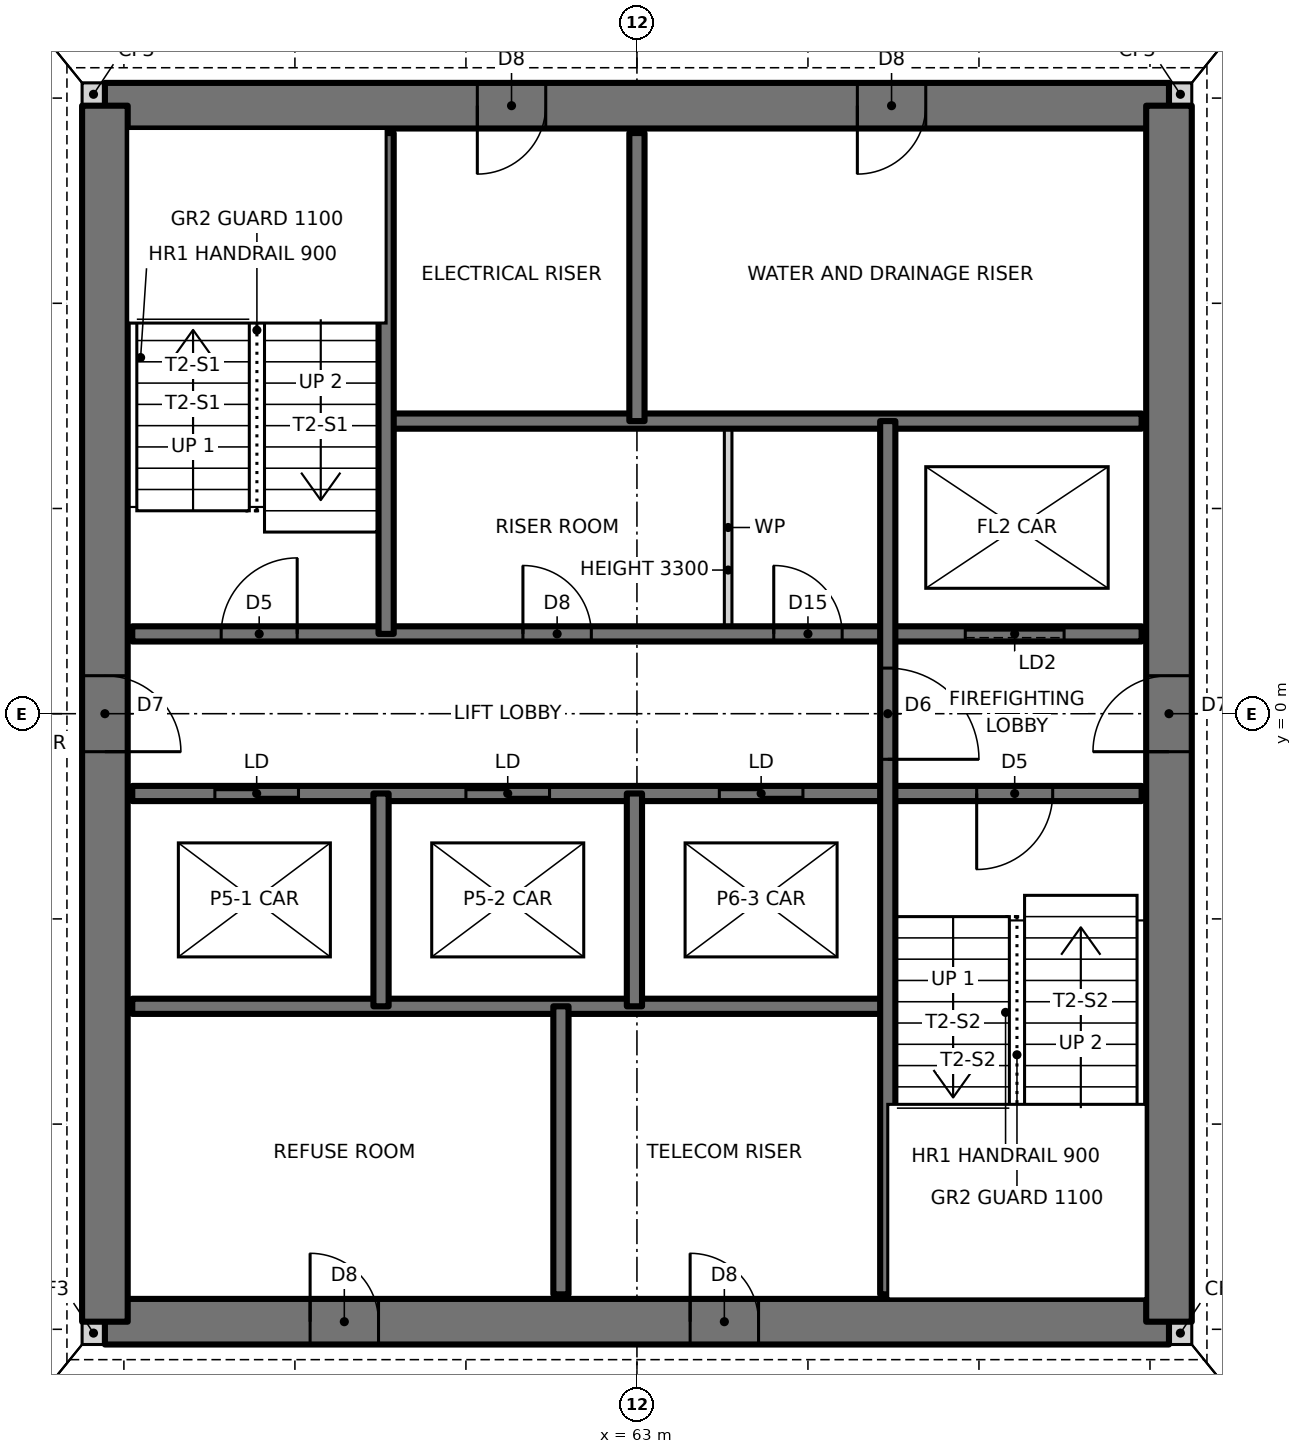
"""IFC4 building model, lengths in metres.
Left out: names, types, materials, properties, quantities, classifications, styles, units other than length and angle.
Written with IfcOpenShell. Run it as: python <this file> out.ifc"""

import sys

from ifc_helpers import new_model, si_unit, direction, frame, frame_2d, origin, place, context, subcontext, project, spatial, rectangle, extrude, element, fill, save


model = new_model("IFC4")
c1 = context("Model", 3, precision=1e-05, world=origin(), true_north=direction((0.0, 1.0)))
c2 = subcontext(c1, "Body", "Model", "MODEL_VIEW")
j1 = project(units=[si_unit("LENGTHUNIT", "METRE"), si_unit("PLANEANGLEUNIT", "RADIAN")], contexts=[c1])
p1 = place(None, origin())
s1 = spatial("IfcSite", under=j1, at=p1, CompositionType="ELEMENT")
p2 = place(p1, origin())
s2 = spatial("IfcBuilding", under=s1, at=p2, CompositionType="ELEMENT")
p3 = place(p2, frame((0.0, 0.0, 101.5)))
s3 = spatial("IfcBuildingStorey", under=s2, at=p3, CompositionType="ELEMENT", Elevation=101.5)
for number, where, z_axis, x_axis in (
    (1, (55.7, -8.15, 0.0), (0.0, 0.0, 1.0), (1.0, 0.0, 0.0)),
    (2, (70.0, -8.15, 0.0), (0.0, 0.0, 1.0), (1.0, 0.0, 0.0)),
    (3, (70.0, 8.15, 0.0), (0.0, 0.0, 1.0), (1.0, 0.0, 0.0)),
    (4, (55.7, 8.15, 0.0), (0.0, 0.0, 1.0), (1.0, 0.0, 0.0)),
):
    element("IfcWall", number, at=place(p3, frame(where, z_axis=z_axis, x_axis=x_axis)), inside=s3, PredefinedType="SOLIDWALL", context=c2, shape_type="SweptSolid", body=[
        extrude(rectangle(XDim=0.3, YDim=0.3, at=frame_2d((0.15, 0.0))), origin(), (0.0, 0.0, 1.0), 3.5),
    ])
p4 = place(p3, frame((56.0, -8.0, 0.0), z_axis=(0.0, 0.0, 1.0), x_axis=(1.0, 0.0, 0.0)))
e5 = element("IfcWall", 5, at=p4, inside=s3, PredefinedType="SHEAR", context=c2, shape_type="SweptSolid", body=[
    extrude(rectangle(XDim=14.0, YDim=0.6, at=frame_2d((7.0, 0.0))), origin(), (0.0, 0.0, 1.0), 3.5),
])
p5 = place(p4, frame((2.7, 0.0, 0.0)))
e6 = element("IfcOpeningElement", 6, at=p5, cuts=e5, PredefinedType="OPENING", context=c2, shape_type="SweptSolid", body=[
    extrude(rectangle(XDim=0.9, YDim=2.1, at=frame_2d((0.45, 1.05))), frame((0.0, 0.31, 0.0), z_axis=(0.0, -1.0, 0.0), x_axis=(1.0, 0.0, 0.0)), (0.0, 0.0, 1.0), 0.62),
])
p6 = place(p4, frame((7.7, 0.0, 0.0)))
e7 = element("IfcOpeningElement", 7, at=p6, cuts=e5, PredefinedType="OPENING", context=c2, shape_type="SweptSolid", body=[
    extrude(rectangle(XDim=0.9, YDim=2.1, at=frame_2d((0.45, 1.05))), frame((0.0, 0.31, 0.0), z_axis=(0.0, -1.0, 0.0), x_axis=(1.0, 0.0, 0.0)), (0.0, 0.0, 1.0), 0.62),
])
p7 = place(p3, frame((70.0, 8.0, 0.0), z_axis=(0.0, 0.0, 1.0), x_axis=(-1.0, 0.0, 0.0)))
e8 = element("IfcWall", 8, at=p7, inside=s3, PredefinedType="SHEAR", context=c2, shape_type="SweptSolid", body=[
    extrude(rectangle(XDim=14.0, YDim=0.6, at=frame_2d((7.0, 0.0))), origin(), (0.0, 0.0, 1.0), 3.5),
])
p8 = place(p7, frame((8.2, 0.0, 0.0)))
e9 = element("IfcOpeningElement", 9, at=p8, cuts=e8, PredefinedType="OPENING", context=c2, shape_type="SweptSolid", body=[
    extrude(rectangle(XDim=0.9, YDim=2.1, at=frame_2d((0.45, 1.05))), frame((0.0, 0.31, 0.0), z_axis=(0.0, -1.0, 0.0), x_axis=(1.0, 0.0, 0.0)), (0.0, 0.0, 1.0), 0.62),
])
p9 = place(p7, frame((3.2, 0.0, 0.0)))
e10 = element("IfcOpeningElement", 10, at=p9, cuts=e8, PredefinedType="OPENING", context=c2, shape_type="SweptSolid", body=[
    extrude(rectangle(XDim=0.9, YDim=2.1, at=frame_2d((0.45, 1.05))), frame((0.0, 0.31, 0.0), z_axis=(0.0, -1.0, 0.0), x_axis=(1.0, 0.0, 0.0)), (0.0, 0.0, 1.0), 0.62),
])
p10 = place(p3, frame((70.0, -8.0, 0.0), z_axis=(0.0, 0.0, 1.0), x_axis=(0.0, 1.0, 0.0)))
e11 = element("IfcWall", 11, at=p10, inside=s3, PredefinedType="SHEAR", context=c2, shape_type="SweptSolid", body=[
    extrude(rectangle(XDim=16.0, YDim=0.6, at=frame_2d((8.0, 0.0))), origin(), (0.0, 0.0, 1.0), 3.5),
])
p11 = place(p10, frame((7.5, 0.0, 0.0)))
e12 = element("IfcOpeningElement", 12, at=p11, cuts=e11, PredefinedType="OPENING", context=c2, shape_type="SweptSolid", body=[
    extrude(rectangle(XDim=1.0, YDim=2.1, at=frame_2d((0.5, 1.05))), frame((0.0, 0.31, 0.0), z_axis=(0.0, -1.0, 0.0), x_axis=(1.0, 0.0, 0.0)), (0.0, 0.0, 1.0), 0.62),
])
p12 = place(p3, frame((56.0, 8.0, 0.0), z_axis=(0.0, 0.0, 1.0), x_axis=(0.0, -1.0, 0.0)))
e13 = element("IfcWall", 13, at=p12, inside=s3, PredefinedType="SHEAR", context=c2, shape_type="SweptSolid", body=[
    extrude(rectangle(XDim=16.0, YDim=0.6, at=frame_2d((8.0, 0.0))), origin(), (0.0, 0.0, 1.0), 3.5),
])
p13 = place(p12, frame((7.5, 0.0, 0.0)))
e14 = element("IfcOpeningElement", 14, at=p13, cuts=e13, PredefinedType="OPENING", context=c2, shape_type="SweptSolid", body=[
    extrude(rectangle(XDim=1.0, YDim=2.1, at=frame_2d((0.5, 1.05))), frame((0.0, 0.31, 0.0), z_axis=(0.0, -1.0, 0.0), x_axis=(1.0, 0.0, 0.0)), (0.0, 0.0, 1.0), 0.62),
])
p14 = place(p3, frame((56.36, -3.85, 0.0), z_axis=(0.0, 0.0, 1.0), x_axis=(1.0, 0.0, 0.0)))
e15 = element("IfcWall", 15, at=p14, inside=s3, PredefinedType="SOLIDWALL", context=c2, shape_type="SweptSolid", body=[
    extrude(rectangle(XDim=9.94, YDim=0.2, at=frame_2d((4.97, 0.0))), origin(), (0.0, 0.0, 1.0), 3.5),
])
p15 = place(p3, frame((56.36, -1.05, 0.0), z_axis=(0.0, 0.0, 1.0), x_axis=(1.0, 0.0, 0.0)))
e16 = element("IfcWall", 16, at=p15, inside=s3, PredefinedType="SOLIDWALL", context=c2, shape_type="SweptSolid", body=[
    extrude(rectangle(XDim=13.28, YDim=0.2, at=frame_2d((6.64, 0.0))), origin(), (0.0, 0.0, 1.0), 3.5),
])
p16 = place(p15, frame((11.11, 0.0, 0.0)))
e17 = element("IfcOpeningElement", 17, at=p16, cuts=e16, PredefinedType="OPENING", context=c2, shape_type="SweptSolid", body=[
    extrude(rectangle(XDim=1.0, YDim=2.1, at=frame_2d((0.5, 1.05))), frame((0.0, 0.11, 0.0), z_axis=(0.0, -1.0, 0.0), x_axis=(1.0, 0.0, 0.0)), (0.0, 0.0, 1.0), 0.22),
])
p17 = place(p15, frame((1.087, 0.0, 0.0)))
e18 = element("IfcOpeningElement", 18, at=p17, cuts=e16, PredefinedType="OPENING", context=c2, shape_type="SweptSolid", body=[
    extrude(rectangle(XDim=1.1, YDim=2.1, at=frame_2d((0.55, 1.05))), frame((0.0, 0.11, 0.0), z_axis=(0.0, -1.0, 0.0), x_axis=(1.0, 0.0, 0.0)), (0.0, 0.0, 1.0), 0.22),
])
p18 = place(p15, frame((4.39, 0.0, 0.0)))
e19 = element("IfcOpeningElement", 19, at=p18, cuts=e16, PredefinedType="OPENING", context=c2, shape_type="SweptSolid", body=[
    extrude(rectangle(XDim=1.1, YDim=2.1, at=frame_2d((0.55, 1.05))), frame((0.0, 0.11, 0.0), z_axis=(0.0, -1.0, 0.0), x_axis=(1.0, 0.0, 0.0)), (0.0, 0.0, 1.0), 0.22),
])
p19 = place(p15, frame((7.724, 0.0, 0.0)))
e20 = element("IfcOpeningElement", 20, at=p19, cuts=e16, PredefinedType="OPENING", context=c2, shape_type="SweptSolid", body=[
    extrude(rectangle(XDim=1.1, YDim=2.1, at=frame_2d((0.55, 1.05))), frame((0.0, 0.11, 0.0), z_axis=(0.0, -1.0, 0.0), x_axis=(1.0, 0.0, 0.0)), (0.0, 0.0, 1.0), 0.22),
])
p20 = place(p3, frame((56.36, 1.05, 0.0), z_axis=(0.0, 0.0, 1.0), x_axis=(1.0, 0.0, 0.0)))
e21 = element("IfcWall", 21, at=p20, inside=s3, PredefinedType="SOLIDWALL", context=c2, shape_type="SweptSolid", body=[
    extrude(rectangle(XDim=13.28, YDim=0.2, at=frame_2d((6.64, 0.0))), origin(), (0.0, 0.0, 1.0), 3.5),
])
p21 = place(p20, frame((1.17, 0.0, 0.0)))
e22 = element("IfcOpeningElement", 22, at=p21, cuts=e21, PredefinedType="OPENING", context=c2, shape_type="SweptSolid", body=[
    extrude(rectangle(XDim=1.0, YDim=2.1, at=frame_2d((0.5, 1.05))), frame((0.0, 0.11, 0.0), z_axis=(0.0, -1.0, 0.0), x_axis=(1.0, 0.0, 0.0)), (0.0, 0.0, 1.0), 0.22),
])
p22 = place(p20, frame((5.14, 0.0, 0.0)))
e23 = element("IfcOpeningElement", 23, at=p22, cuts=e21, PredefinedType="OPENING", context=c2, shape_type="SweptSolid", body=[
    extrude(rectangle(XDim=0.9, YDim=2.1, at=frame_2d((0.45, 1.05))), frame((0.0, 0.11, 0.0), z_axis=(0.0, -1.0, 0.0), x_axis=(1.0, 0.0, 0.0)), (0.0, 0.0, 1.0), 0.22),
])
p23 = place(p20, frame((8.44, 0.0, 0.0)))
e24 = element("IfcOpeningElement", 24, at=p23, cuts=e21, PredefinedType="OPENING", context=c2, shape_type="SweptSolid", body=[
    extrude(rectangle(XDim=0.9, YDim=2.1, at=frame_2d((0.45, 1.05))), frame((0.0, 0.11, 0.0), z_axis=(0.0, -1.0, 0.0), x_axis=(1.0, 0.0, 0.0)), (0.0, 0.0, 1.0), 0.22),
])
p24 = place(p20, frame((10.96, 0.0, 0.0)))
e25 = element("IfcOpeningElement", 25, at=p24, cuts=e21, PredefinedType="OPENING", context=c2, shape_type="SweptSolid", body=[
    extrude(rectangle(XDim=1.3, YDim=2.1, at=frame_2d((0.65, 1.05))), frame((0.0, 0.11, 0.0), z_axis=(0.0, -1.0, 0.0), x_axis=(1.0, 0.0, 0.0)), (0.0, 0.0, 1.0), 0.22),
])
p25 = place(p3, frame((59.7, 3.85, 0.0), z_axis=(0.0, 0.0, 1.0), x_axis=(1.0, 0.0, 0.0)))
e26 = element("IfcWall", 26, at=p25, inside=s3, PredefinedType="SOLIDWALL", context=c2, shape_type="SweptSolid", body=[
    extrude(rectangle(XDim=9.94, YDim=0.2, at=frame_2d((4.97, 0.0))), origin(), (0.0, 0.0, 1.0), 3.5),
])
p26 = place(p3, frame((66.3, -7.64, 0.0), z_axis=(0.0, 0.0, 1.0), x_axis=(0.0, 1.0, 0.0)))
e27 = element("IfcWall", 27, at=p26, inside=s3, PredefinedType="SOLIDWALL", context=c2, shape_type="SweptSolid", body=[
    extrude(rectangle(XDim=11.49, YDim=0.2, at=frame_2d((5.745, 0.0))), origin(), (0.0, 0.0, 1.0), 3.5),
])
p27 = place(p26, frame((7.04, 0.0, 0.0)))
e28 = element("IfcOpeningElement", 28, at=p27, cuts=e27, PredefinedType="OPENING", context=c2, shape_type="SweptSolid", body=[
    extrude(rectangle(XDim=1.2, YDim=2.1, at=frame_2d((0.6, 1.05))), frame((0.0, 0.11, 0.0), z_axis=(0.0, -1.0, 0.0), x_axis=(1.0, 0.0, 0.0)), (0.0, 0.0, 1.0), 0.22),
])
p28 = place(p3, frame((64.2, 1.05, 0.0), z_axis=(0.0, 0.0, 1.0), x_axis=(0.0, 1.0, 0.0)))
e29 = element("IfcWall", 29, at=p28, inside=s3, PredefinedType="PARTITIONING", context=c2, shape_type="SweptSolid", body=[
    extrude(rectangle(XDim=2.8, YDim=0.1, at=frame_2d((1.4, 0.0))), origin(), (0.0, 0.0, 1.0), 3.3),
])
p29 = place(p3, frame((63.0, 3.85, 0.0), z_axis=(0.0, 0.0, 1.0), x_axis=(0.0, 1.0, 0.0)))
e30 = element("IfcWall", 30, at=p29, inside=s3, PredefinedType="SOLIDWALL", context=c2, shape_type="SweptSolid", body=[
    extrude(rectangle(XDim=3.79, YDim=0.2, at=frame_2d((1.895, 0.0))), origin(), (0.0, 0.0, 1.0), 3.5),
])
p30 = place(p3, frame((62.967, -3.85, 0.0), z_axis=(0.0, 0.0, 1.0), x_axis=(0.0, 1.0, 0.0)))
e31 = element("IfcWall", 31, at=p30, inside=s3, PredefinedType="SOLIDWALL", context=c2, shape_type="SweptSolid", body=[
    extrude(rectangle(XDim=2.8, YDim=0.2, at=frame_2d((1.4, 0.0))), origin(), (0.0, 0.0, 1.0), 3.5),
])
p31 = place(p3, frame((62.0, -7.64, 0.0), z_axis=(0.0, 0.0, 1.0), x_axis=(0.0, 1.0, 0.0)))
e32 = element("IfcWall", 32, at=p31, inside=s3, PredefinedType="SOLIDWALL", context=c2, shape_type="SweptSolid", body=[
    extrude(rectangle(XDim=3.79, YDim=0.2, at=frame_2d((1.895, 0.0))), origin(), (0.0, 0.0, 1.0), 3.5),
])
p32 = place(p3, frame((59.7, 1.05, 0.0), z_axis=(0.0, 0.0, 1.0), x_axis=(0.0, 1.0, 0.0)))
e33 = element("IfcWall", 33, at=p32, inside=s3, PredefinedType="SOLIDWALL", context=c2, shape_type="SweptSolid", body=[
    extrude(rectangle(XDim=6.59, YDim=0.2, at=frame_2d((3.295, 0.0))), origin(), (0.0, 0.0, 1.0), 3.5),
])
p33 = place(p3, frame((59.633, -3.85, 0.0), z_axis=(0.0, 0.0, 1.0), x_axis=(0.0, 1.0, 0.0)))
e34 = element("IfcWall", 34, at=p33, inside=s3, PredefinedType="SOLIDWALL", context=c2, shape_type="SweptSolid", body=[
    extrude(rectangle(XDim=2.8, YDim=0.2, at=frame_2d((1.4, 0.0))), origin(), (0.0, 0.0, 1.0), 3.5),
])
p34 = place(p21, origin())
e35 = element("IfcDoor", 35, at=p34, inside=s3, OperationType="SINGLE_SWING_RIGHT", PredefinedType="DOOR", context=c2, shape_type="SweptSolid", body=[
    extrude(rectangle(XDim=1.0, YDim=2.1, at=frame_2d((0.5, 1.05))), frame((0.0, 0.025, 0.0), z_axis=(0.0, -1.0, 0.0), x_axis=(1.0, 0.0, 0.0)), (0.0, 0.0, 1.0), 0.05),
])
fill(e22, e35)
p35 = place(p16, frame((1.0, 0.0, 0.0), z_axis=(0.0, 0.0, 1.0), x_axis=(-1.0, 0.0, 0.0)))
e36 = element("IfcDoor", 36, at=p35, inside=s3, OperationType="SINGLE_SWING_RIGHT", PredefinedType="DOOR", context=c2, shape_type="SweptSolid", body=[
    extrude(rectangle(XDim=1.0, YDim=2.1, at=frame_2d((0.5, 1.05))), frame((0.0, 0.025, 0.0), z_axis=(0.0, -1.0, 0.0), x_axis=(1.0, 0.0, 0.0)), (0.0, 0.0, 1.0), 0.05),
])
fill(e17, e36)
p36 = place(p27, frame((1.2, 0.0, 0.0), z_axis=(0.0, 0.0, 1.0), x_axis=(-1.0, 0.0, 0.0)))
e37 = element("IfcDoor", 37, at=p36, inside=s3, OperationType="SINGLE_SWING_RIGHT", PredefinedType="DOOR", context=c2, shape_type="SweptSolid", body=[
    extrude(rectangle(XDim=1.2, YDim=2.1, at=frame_2d((0.6, 1.05))), frame((0.0, 0.025, 0.0), z_axis=(0.0, -1.0, 0.0), x_axis=(1.0, 0.0, 0.0)), (0.0, 0.0, 1.0), 0.05),
])
fill(e28, e37)
p37 = place(p22, origin())
e38 = element("IfcDoor", 38, at=p37, inside=s3, OperationType="SINGLE_SWING_LEFT", PredefinedType="DOOR", context=c2, shape_type="SweptSolid", body=[
    extrude(rectangle(XDim=0.9, YDim=2.1, at=frame_2d((0.45, 1.05))), frame((0.0, 0.025, 0.0), z_axis=(0.0, -1.0, 0.0), x_axis=(1.0, 0.0, 0.0)), (0.0, 0.0, 1.0), 0.05),
])
fill(e23, e38)
p38 = place(p23, origin())
e39 = element("IfcDoor", 39, at=p38, inside=s3, OperationType="SINGLE_SWING_LEFT", PredefinedType="DOOR", context=c2, shape_type="SweptSolid", body=[
    extrude(rectangle(XDim=0.9, YDim=2.1, at=frame_2d((0.45, 1.05))), frame((0.0, 0.025, 0.0), z_axis=(0.0, -1.0, 0.0), x_axis=(1.0, 0.0, 0.0)), (0.0, 0.0, 1.0), 0.05),
])
fill(e24, e39)
p39 = place(p13, origin())
e40 = element("IfcDoor", 40, at=p39, inside=s3, OperationType="SINGLE_SWING_RIGHT", PredefinedType="DOOR", context=c2, shape_type="SweptSolid", body=[
    extrude(rectangle(XDim=1.0, YDim=2.1, at=frame_2d((0.5, 1.05))), frame((0.0, 0.025, 0.0), z_axis=(0.0, -1.0, 0.0), x_axis=(1.0, 0.0, 0.0)), (0.0, 0.0, 1.0), 0.05),
])
fill(e14, e40)
p40 = place(p11, origin())
e41 = element("IfcDoor", 41, at=p40, inside=s3, OperationType="SINGLE_SWING_LEFT", PredefinedType="DOOR", context=c2, shape_type="SweptSolid", body=[
    extrude(rectangle(XDim=1.0, YDim=2.1, at=frame_2d((0.5, 1.05))), frame((0.0, 0.025, 0.0), z_axis=(0.0, -1.0, 0.0), x_axis=(1.0, 0.0, 0.0)), (0.0, 0.0, 1.0), 0.05),
])
fill(e12, e41)
p41 = place(p8, origin())
e42 = element("IfcDoor", 42, at=p41, inside=s3, OperationType="SINGLE_SWING_RIGHT", PredefinedType="DOOR", context=c2, shape_type="SweptSolid", body=[
    extrude(rectangle(XDim=0.9, YDim=2.1, at=frame_2d((0.45, 1.05))), frame((0.0, 0.025, 0.0), z_axis=(0.0, -1.0, 0.0), x_axis=(1.0, 0.0, 0.0)), (0.0, 0.0, 1.0), 0.05),
])
fill(e9, e42)
p42 = place(p9, origin())
e43 = element("IfcDoor", 43, at=p42, inside=s3, OperationType="SINGLE_SWING_RIGHT", PredefinedType="DOOR", context=c2, shape_type="SweptSolid", body=[
    extrude(rectangle(XDim=0.9, YDim=2.1, at=frame_2d((0.45, 1.05))), frame((0.0, 0.025, 0.0), z_axis=(0.0, -1.0, 0.0), x_axis=(1.0, 0.0, 0.0)), (0.0, 0.0, 1.0), 0.05),
])
fill(e10, e43)
p43 = place(p5, origin())
e44 = element("IfcDoor", 44, at=p43, inside=s3, OperationType="SINGLE_SWING_LEFT", PredefinedType="DOOR", context=c2, shape_type="SweptSolid", body=[
    extrude(rectangle(XDim=0.9, YDim=2.1, at=frame_2d((0.45, 1.05))), frame((0.0, 0.025, 0.0), z_axis=(0.0, -1.0, 0.0), x_axis=(1.0, 0.0, 0.0)), (0.0, 0.0, 1.0), 0.05),
])
fill(e6, e44)
p44 = place(p6, origin())
e45 = element("IfcDoor", 45, at=p44, inside=s3, OperationType="SINGLE_SWING_LEFT", PredefinedType="DOOR", context=c2, shape_type="SweptSolid", body=[
    extrude(rectangle(XDim=0.9, YDim=2.1, at=frame_2d((0.45, 1.05))), frame((0.0, 0.025, 0.0), z_axis=(0.0, -1.0, 0.0), x_axis=(1.0, 0.0, 0.0)), (0.0, 0.0, 1.0), 0.05),
])
fill(e7, e45)
p45 = place(p17, origin())
e46 = element("IfcDoor", 46, at=p45, inside=s3, OperationType="DOUBLE_DOOR_SLIDING", PredefinedType="DOOR", context=c2, shape_type="SweptSolid", body=[
    extrude(rectangle(XDim=1.1, YDim=2.1, at=frame_2d((0.55, 1.05))), frame((0.0, 0.025, 0.0), z_axis=(0.0, -1.0, 0.0), x_axis=(1.0, 0.0, 0.0)), (0.0, 0.0, 1.0), 0.05),
])
fill(e18, e46)
p46 = place(p18, origin())
e47 = element("IfcDoor", 47, at=p46, inside=s3, OperationType="DOUBLE_DOOR_SLIDING", PredefinedType="DOOR", context=c2, shape_type="SweptSolid", body=[
    extrude(rectangle(XDim=1.1, YDim=2.1, at=frame_2d((0.55, 1.05))), frame((0.0, 0.025, 0.0), z_axis=(0.0, -1.0, 0.0), x_axis=(1.0, 0.0, 0.0)), (0.0, 0.0, 1.0), 0.05),
])
fill(e19, e47)
p47 = place(p19, origin())
e48 = element("IfcDoor", 48, at=p47, inside=s3, OperationType="DOUBLE_DOOR_SLIDING", PredefinedType="DOOR", context=c2, shape_type="SweptSolid", body=[
    extrude(rectangle(XDim=1.1, YDim=2.1, at=frame_2d((0.55, 1.05))), frame((0.0, 0.025, 0.0), z_axis=(0.0, -1.0, 0.0), x_axis=(1.0, 0.0, 0.0)), (0.0, 0.0, 1.0), 0.05),
])
fill(e20, e48)
p48 = place(p24, origin())
e49 = element("IfcDoor", 49, at=p48, inside=s3, OperationType="SLIDING_TO_LEFT", PredefinedType="DOOR", context=c2, shape_type="SweptSolid", body=[
    extrude(rectangle(XDim=1.3, YDim=2.1, at=frame_2d((0.65, 1.05))), frame((0.0, 0.025, 0.0), z_axis=(0.0, -1.0, 0.0), x_axis=(1.0, 0.0, 0.0)), (0.0, 0.0, 1.0), 0.05),
])
fill(e25, e49)
save(model, sys.argv[1])
